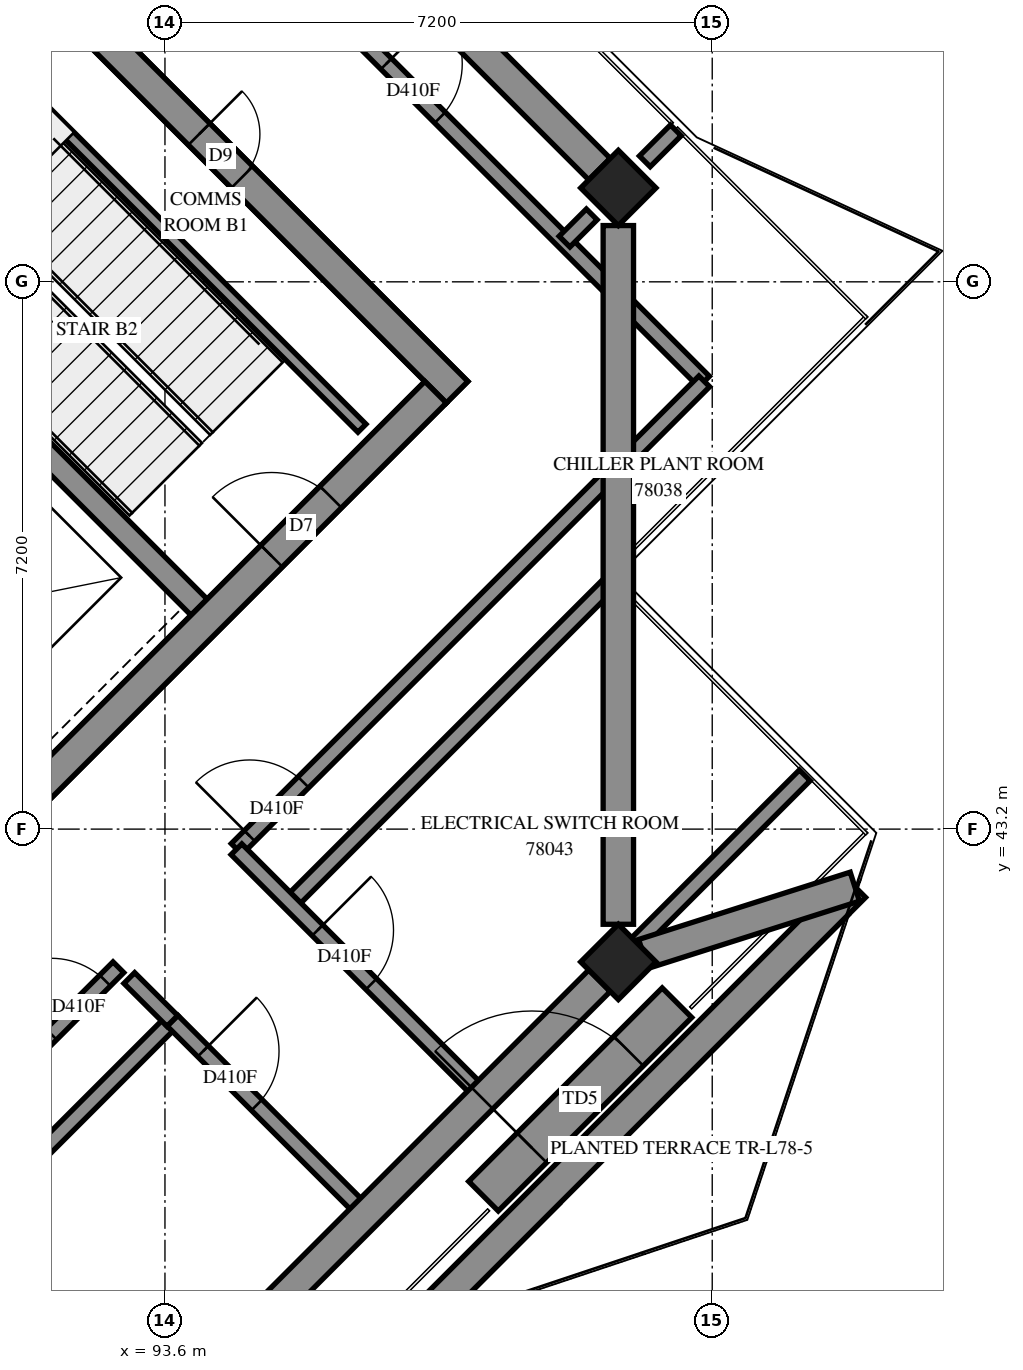
"""IFC4 building model, lengths in metres.
Left out: names, types, materials, properties, quantities, classifications, styles, units other than length and angle.
Written with IfcOpenShell. Run it as: python <this file> out.ifc"""

import sys

from ifc_helpers import new_model, si_unit, direction, frame, frame_2d, origin, origin_2d, place, context, subcontext, project, spatial, polyline, rectangle, outline, extrude, element, fill, save


model = new_model("IFC4")
c1 = context("Model", 3, precision=1e-05, world=origin(), true_north=direction((0.0, 1.0)))
c2 = subcontext(c1, "Body", "Model", "MODEL_VIEW")
j1 = project(units=[si_unit("LENGTHUNIT", "METRE"), si_unit("PLANEANGLEUNIT", "RADIAN")], contexts=[c1])
p1 = place(None, origin())
s1 = spatial("IfcSite", under=j1, at=p1, CompositionType="ELEMENT")
p2 = place(p1, origin())
s2 = spatial("IfcBuilding", under=s1, at=p2, CompositionType="ELEMENT")
p3 = place(p2, frame((0.0, 0.0, 284.6)))
s3 = spatial("IfcBuildingStorey", under=s2, at=p3, CompositionType="ELEMENT", Elevation=284.6)
for number, where, z_axis, x_axis in (
    (1, (99.565, 51.635, 0.0), (0.0, 0.0, 1.0), (0.707, -0.707, 0.0)),
    (2, (99.565, 41.453, 0.0), (0.0, 0.0, 1.0), (0.707, -0.707, 0.0)),
):
    element("IfcColumn", number, at=place(p3, frame(where, z_axis=z_axis, x_axis=x_axis)), inside=s3, PredefinedType="COLUMN", context=c2, shape_type="SweptSolid", body=[
        extrude(rectangle(XDim=0.7, YDim=0.7, at=origin_2d()), origin(), (0.0, 0.0, 1.0), 5.7),
    ])
p4 = place(p3, frame((86.695, 59.696, -0.3), z_axis=(0.0, 0.0, 1.0), x_axis=(0.7071100706, -0.7071034917, 0.0)))
e3 = element("IfcWall", 3, at=p4, inside=s3, PredefinedType="SHEAR", context=c2, shape_type="SweptSolid", body=[
    extrude(rectangle(XDim=15.2, YDim=0.4, at=frame_2d((7.6, 0.0))), origin(), (0.0, 0.0, 1.0), 5.3),
])
p5 = place(p4, frame((10.4, 0.0, 0.3)))
e4 = element("IfcOpeningElement", 4, at=p5, cuts=e3, PredefinedType="OPENING", context=c2, shape_type="SweptSolid", body=[
    extrude(rectangle(XDim=0.8, YDim=2.1, at=frame_2d((0.4, 1.05))), frame((0.0, 0.21, 0.0), z_axis=(0.0, -1.0, 0.0), x_axis=(1.0, 0.0, 0.0)), (0.0, 0.0, 1.0), 0.42),
])
p6 = place(p3, frame((86.978, 38.766, -0.3), z_axis=(0.0, 0.0, 1.0), x_axis=(0.7071067812, 0.7071067812, 0.0)))
e5 = element("IfcWall", 5, at=p6, inside=s3, PredefinedType="SHEAR", context=c2, shape_type="SweptSolid", body=[
    extrude(rectangle(XDim=14.4, YDim=0.4, at=frame_2d((7.2, 0.0))), origin(), (0.0, 0.0, 1.0), 5.3),
])
p7 = place(p6, frame((4.55, 0.0, 0.3)))
e6 = element("IfcOpeningElement", 6, at=p7, cuts=e5, PredefinedType="OPENING", context=c2, shape_type="SweptSolid", body=[
    extrude(rectangle(XDim=1.1, YDim=2.1, at=frame_2d((0.55, 1.05))), frame((0.0, 0.21, 0.0), z_axis=(0.0, -1.0, 0.0), x_axis=(1.0, 0.0, 0.0)), (0.0, 0.0, 1.0), 0.42),
])
p8 = place(p6, frame((11.35, 0.0, 0.3)))
e7 = element("IfcOpeningElement", 7, at=p8, cuts=e5, PredefinedType="OPENING", context=c2, shape_type="SweptSolid", body=[
    extrude(rectangle(XDim=1.1, YDim=2.1, at=frame_2d((0.55, 1.05))), frame((0.0, 0.21, 0.0), z_axis=(0.0, -1.0, 0.0), x_axis=(1.0, 0.0, 0.0)), (0.0, 0.0, 1.0), 0.42),
])
p9 = place(p3, frame((88.958, 51.211, 0.0), z_axis=(0.0, 0.0, 1.0), x_axis=(0.7070998367, -0.7071137256, 0.0)))
e8 = element("IfcWall", 8, at=p9, inside=s3, PredefinedType="SOLIDWALL", context=c2, shape_type="SweptSolid", body=[
    extrude(rectangle(XDim=7.2, YDim=0.3, at=frame_2d((3.6, 0.0))), origin(), (0.0, 0.0, 1.0), 5.7),
])
p10 = place(p3, frame((97.79, 38.371, 0.0), z_axis=(0.0, 0.0, 1.0), x_axis=(0.7071067812, 0.7071067812, 0.0)))
e9 = element("IfcWall", 9, at=p10, inside=s3, PredefinedType="SOLIDWALL", context=c2, shape_type="SweptSolid", body=[
    extrude(rectangle(XDim=3.6, YDim=0.55, at=frame_2d((1.8, 0.0))), origin(), (0.0, 0.0, 1.0), 5.7),
])
p11 = place(p10, frame((0.9, 0.0, 0.0)))
e10 = element("IfcOpeningElement", 10, at=p11, cuts=e9, PredefinedType="OPENING", context=c2, shape_type="SweptSolid", body=[
    extrude(rectangle(XDim=1.8, YDim=2.4, at=frame_2d((0.9, 1.2))), frame((0.0, 0.285, 0.0), z_axis=(0.0, -1.0, 0.0), x_axis=(1.0, 0.0, 0.0)), (0.0, 0.0, 1.0), 0.57),
])
p12 = place(p3, frame((91.313, 53.354, 0.0), z_axis=(0.0, 0.0, 1.0), x_axis=(0.7071140275, -0.7070995348, 0.0)))
e11 = element("IfcWall", 11, at=p12, inside=s3, PredefinedType="PARTITIONING", context=c2, shape_type="SweptSolid", body=[
    extrude(rectangle(XDim=6.9, YDim=0.15, at=frame_2d((3.45, 0.0))), origin(), (0.0, 0.0, 1.0), 5.7),
])
p13 = place(p3, frame((86.833, 62.947, 0.0), z_axis=(0.0, 0.0, 1.0), x_axis=(0.7071067812, -0.7071067812, 0.0)))
e12 = element("IfcWall", 12, at=p13, inside=s3, PredefinedType="PARTITIONING", context=c2, shape_type="SweptSolid", body=[
    extrude(rectangle(XDim=19.601, YDim=0.2, at=frame_2d((9.8, 0.0))), origin(), (0.0, 0.0, 1.0), 5.7),
])
p14 = place(p13, frame((6.487, 0.0, 0.0)))
e13 = element("IfcOpeningElement", 13, at=p14, cuts=e12, PredefinedType="OPENING", context=c2, shape_type="SweptSolid", body=[
    extrude(rectangle(XDim=1.0, YDim=2.1, at=frame_2d((0.5, 1.05))), frame((0.0, 0.11, 0.0), z_axis=(0.0, -1.0, 0.0), x_axis=(1.0, 0.0, 0.0)), (0.0, 0.0, 1.0), 0.22),
])
p15 = place(p13, frame((13.688, 0.0, 0.0)))
e14 = element("IfcOpeningElement", 14, at=p15, cuts=e12, PredefinedType="OPENING", context=c2, shape_type="SweptSolid", body=[
    extrude(rectangle(XDim=1.0, YDim=2.1, at=frame_2d((0.5, 1.05))), frame((0.0, 0.11, 0.0), z_axis=(0.0, -1.0, 0.0), x_axis=(1.0, 0.0, 0.0)), (0.0, 0.0, 1.0), 0.22),
])
p16 = place(p3, frame((86.079, 33.061, 0.0), z_axis=(0.0, 0.0, 1.0), x_axis=(0.7071067812, 0.7071067812, 0.0)))
e15 = element("IfcWall", 15, at=p16, inside=s3, PredefinedType="PARTITIONING", context=c2, shape_type="SweptSolid", body=[
    extrude(rectangle(XDim=10.771, YDim=0.2, at=frame_2d((5.385, 0.0))), origin(), (0.0, 0.0, 1.0), 5.7),
])
p17 = place(p3, frame((94.543, 42.939, 0.0), z_axis=(0.0, 0.0, 1.0), x_axis=(0.7071067812, 0.7071067812, 0.0)))
e16 = element("IfcWall", 16, at=p17, inside=s3, PredefinedType="PARTITIONING", context=c2, shape_type="SweptSolid", body=[
    extrude(rectangle(XDim=8.7, YDim=0.2, at=frame_2d((4.35, 0.0))), origin(), (0.0, 0.0, 1.0), 5.7),
])
p18 = place(p17, frame((0.242, 0.0, 0.0)))
e17 = element("IfcOpeningElement", 17, at=p18, cuts=e16, PredefinedType="OPENING", context=c2, shape_type="SweptSolid", body=[
    extrude(rectangle(XDim=1.0, YDim=2.1, at=frame_2d((0.5, 1.05))), frame((0.0, 0.11, 0.0), z_axis=(0.0, -1.0, 0.0), x_axis=(1.0, 0.0, 0.0)), (0.0, 0.0, 1.0), 0.22),
])
p19 = place(p3, frame((86.837, 35.233, 0.0), z_axis=(0.0, 0.0, 1.0), x_axis=(0.7071067812, 0.7071067812, 0.0)))
e18 = element("IfcWall", 18, at=p19, inside=s3, PredefinedType="PARTITIONING", context=c2, shape_type="SweptSolid", body=[
    extrude(rectangle(XDim=8.697, YDim=0.2, at=frame_2d((4.349, 0.0))), origin(), (0.0, 0.0, 1.0), 5.7),
])
p20 = place(p19, frame((7.45, 0.0, 0.0)))
e19 = element("IfcOpeningElement", 19, at=p20, cuts=e18, PredefinedType="OPENING", context=c2, shape_type="SweptSolid", body=[
    extrude(rectangle(XDim=1.0, YDim=2.1, at=frame_2d((0.5, 1.05))), frame((0.0, 0.11, 0.0), z_axis=(0.0, -1.0, 0.0), x_axis=(1.0, 0.0, 0.0)), (0.0, 0.0, 1.0), 0.22),
])
p21 = place(p3, frame((95.25, 42.232, 0.0), z_axis=(0.0, 0.0, 1.0), x_axis=(0.7071067812, 0.7071067812, 0.0)))
e20 = element("IfcWall", 20, at=p21, inside=s3, PredefinedType="PARTITIONING", context=c2, shape_type="SweptSolid", body=[
    extrude(rectangle(XDim=5.971, YDim=0.2, at=frame_2d((2.985, 0.0))), origin(), (0.0, 0.0, 1.0), 5.7),
])
p22 = place(p3, frame((94.541, 42.935, 0.0), z_axis=(0.0, 0.0, 1.0), x_axis=(0.7071067812, -0.7071067812, 0.0)))
e21 = element("IfcWall", 21, at=p22, inside=s3, PredefinedType="PARTITIONING", context=c2, shape_type="SweptSolid", body=[
    extrude(rectangle(XDim=4.599, YDim=0.2, at=frame_2d((2.3, 0.0))), origin(), (0.0, 0.0, 1.0), 5.7),
])
p23 = place(p22, frame((1.508, 0.0, 0.0)))
e22 = element("IfcOpeningElement", 22, at=p23, cuts=e21, PredefinedType="OPENING", context=c2, shape_type="SweptSolid", body=[
    extrude(rectangle(XDim=1.0, YDim=2.1, at=frame_2d((0.5, 1.05))), frame((0.0, 0.11, 0.0), z_axis=(0.0, -1.0, 0.0), x_axis=(1.0, 0.0, 0.0)), (0.0, 0.0, 1.0), 0.22),
])
p24 = place(p3, frame((93.699, 40.679, 0.0), z_axis=(0.0, 0.0, 1.0), x_axis=(0.7071067812, -0.7071067812, 0.0)))
e23 = element("IfcWall", 23, at=p24, inside=s3, PredefinedType="PARTITIONING", context=c2, shape_type="SweptSolid", body=[
    extrude(rectangle(XDim=3.601, YDim=0.2, at=frame_2d((1.8, 0.0))), origin(), (0.0, 0.0, 1.0), 5.7),
])
p25 = place(p24, frame((0.568, 0.0, 0.0)))
e24 = element("IfcOpeningElement", 24, at=p25, cuts=e23, PredefinedType="OPENING", context=c2, shape_type="SweptSolid", body=[
    extrude(rectangle(XDim=1.0, YDim=2.1, at=frame_2d((0.5, 1.05))), frame((0.0, 0.11, 0.0), z_axis=(0.0, -1.0, 0.0), x_axis=(1.0, 0.0, 0.0)), (0.0, 0.0, 1.0), 0.22),
])
p26 = place(p3, frame((99.214, 41.104, 0.0), z_axis=(0.0, 0.0, 1.0), x_axis=(0.7071067812, 0.7071067812, 0.0)))
e25 = element("IfcWall", 25, at=p26, inside=s3, PredefinedType="PARTITIONING", context=c2, shape_type="SweptSolid", body=[
    extrude(rectangle(XDim=3.966, YDim=0.2, at=frame_2d((1.983, 0.0))), origin(), (0.0, 0.0, 1.0), 5.7),
])
p27 = place(p3, frame((96.24, 38.132, 0.0), z_axis=(0.0, 0.0, 1.0), x_axis=(0.706651904, 0.7075613659, 0.0)))
e26 = element("IfcWall", 26, at=p27, inside=s3, PredefinedType="PARTITIONING", context=c2, shape_type="SweptSolid", body=[
    extrude(rectangle(XDim=2.199, YDim=0.2, at=frame_2d((1.1, 0.0))), origin(), (0.0, 0.0, 1.0), 5.2),
])
for number, where, z_axis, x_axis in (
    (27, (94.823, 36.713, 0.0), (0.0, 0.0, 1.0), (0.707, 0.707, 0.0)),
    (28, (97.796, 39.686, 0.0), (0.0, 0.0, 1.0), (0.707, 0.707, 0.0)),
):
    element("IfcWall", number, at=place(p3, frame(where, z_axis=z_axis, x_axis=x_axis)), inside=s3, PredefinedType="PARTITIONING", context=c2, shape_type="SweptSolid", body=[
        extrude(rectangle(XDim=2.005, YDim=0.2, at=frame_2d((1.003, 0.0))), origin(), (0.0, 0.0, 1.0), 5.2),
    ])
p28 = place(p3, frame((93.131, 41.241, 0.0), z_axis=(0.0, 0.0, 1.0), x_axis=(0.7083571881, -0.7058541592, 0.0)))
e29 = element("IfcWall", 29, at=p28, inside=s3, PredefinedType="PARTITIONING", context=c2, shape_type="SweptSolid", body=[
    extrude(rectangle(XDim=0.799, YDim=0.2, at=frame_2d((0.4, 0.0))), origin(), (0.0, 0.0, 1.0), 5.7),
])
p29 = place(p3, frame((99.913, 51.985, 0.0), z_axis=(0.0, 0.0, 1.0), x_axis=(0.7071067812, 0.7071067812, 0.0)))
e30 = element("IfcWall", 30, at=p29, inside=s3, PredefinedType="PARTITIONING", context=c2, shape_type="SweptSolid", body=[
    extrude(rectangle(XDim=0.577, YDim=0.2, at=frame_2d((0.288, 0.0))), origin(), (0.0, 0.0, 1.0), 5.7),
])
p30 = place(p3, frame((98.857, 50.929, 0.0), z_axis=(0.0, 0.0, 1.0), x_axis=(0.7071067812, 0.7071067812, 0.0)))
e31 = element("IfcWall", 31, at=p30, inside=s3, PredefinedType="PARTITIONING", context=c2, shape_type="SweptSolid", body=[
    extrude(rectangle(XDim=0.506, YDim=0.2, at=frame_2d((0.253, 0.0))), origin(), (0.0, 0.0, 1.0), 5.7),
])
p31 = place(p3, frame((102.518, 42.143, 0.0), z_axis=(0.0, 0.0, 1.0), x_axis=(-0.7071067812, -0.7071067812, 0.0)))
e32 = element("IfcWall", 32, at=p31, inside=s3, PredefinedType="PARAPET", context=c2, shape_type="SweptSolid", body=[
    extrude(outline(polyline([(0.0, -0.1), (3.04, -0.1), (3.04, 0.1), (0.0, 0.1), (0.0, -0.1)])), origin(), (0.0, 0.0, 1.0), 0.25),
])
p32 = place(p3, frame((98.713, 38.339, 0.0), z_axis=(0.0, 0.0, 1.0), x_axis=(-0.7071297964, -0.7070837653, 0.0)))
e33 = element("IfcWall", 33, at=p32, inside=s3, PredefinedType="PARAPET", context=c2, shape_type="SweptSolid", body=[
    extrude(outline(polyline([(0.0, -0.1), (2.172, -0.1), (2.172, 0.1), (0.0, 0.1), (0.0, -0.1)])), origin(), (0.0, 0.0, 1.0), 0.25),
])
p33 = place(p11, origin())
e34 = element("IfcDoor", 34, at=p33, inside=s3, OperationType="SINGLE_SWING_LEFT", PredefinedType="DOOR", context=c2, shape_type="SweptSolid", body=[
    extrude(rectangle(XDim=1.8, YDim=2.4, at=frame_2d((0.9, 1.2))), frame((0.0, 0.025, 0.0), z_axis=(0.0, -1.0, 0.0), x_axis=(1.0, 0.0, 0.0)), (0.0, 0.0, 1.0), 0.05),
])
fill(e10, e34)
p34 = place(p5, origin())
e35 = element("IfcDoor", 35, at=p34, inside=s3, OperationType="SINGLE_SWING_RIGHT", PredefinedType="DOOR", context=c2, shape_type="SweptSolid", body=[
    extrude(rectangle(XDim=0.8, YDim=2.1, at=frame_2d((0.4, 1.05))), frame((0.0, 0.025, 0.0), z_axis=(0.0, -1.0, 0.0), x_axis=(1.0, 0.0, 0.0)), (0.0, 0.0, 1.0), 0.05),
])
fill(e4, e35)
p35 = place(p8, origin())
e36 = element("IfcDoor", 36, at=p35, inside=s3, OperationType="SINGLE_SWING_RIGHT", PredefinedType="DOOR", context=c2, shape_type="SweptSolid", body=[
    extrude(rectangle(XDim=1.1, YDim=2.1, at=frame_2d((0.55, 1.05))), frame((0.0, 0.025, 0.0), z_axis=(0.0, -1.0, 0.0), x_axis=(1.0, 0.0, 0.0)), (0.0, 0.0, 1.0), 0.05),
])
fill(e7, e36)
p36 = place(p18, origin())
e37 = element("IfcDoor", 37, at=p36, inside=s3, OperationType="SINGLE_SWING_LEFT", PredefinedType="DOOR", context=c2, shape_type="SweptSolid", body=[
    extrude(rectangle(XDim=1.0, YDim=2.1, at=frame_2d((0.5, 1.05))), frame((0.0, 0.025, 0.0), z_axis=(0.0, -1.0, 0.0), x_axis=(1.0, 0.0, 0.0)), (0.0, 0.0, 1.0), 0.05),
])
fill(e17, e37)
p37 = place(p15, origin())
e38 = element("IfcDoor", 38, at=p37, inside=s3, OperationType="SINGLE_SWING_LEFT", PredefinedType="DOOR", context=c2, shape_type="SweptSolid", body=[
    extrude(rectangle(XDim=1.0, YDim=2.1, at=frame_2d((0.5, 1.05))), frame((0.0, 0.025, 0.0), z_axis=(0.0, -1.0, 0.0), x_axis=(1.0, 0.0, 0.0)), (0.0, 0.0, 1.0), 0.05),
])
fill(e14, e38)
p38 = place(p20, origin())
e39 = element("IfcDoor", 39, at=p38, inside=s3, OperationType="SINGLE_SWING_LEFT", PredefinedType="DOOR", context=c2, shape_type="SweptSolid", body=[
    extrude(rectangle(XDim=1.0, YDim=2.1, at=frame_2d((0.5, 1.05))), frame((0.0, 0.025, 0.0), z_axis=(0.0, -1.0, 0.0), x_axis=(1.0, 0.0, 0.0)), (0.0, 0.0, 1.0), 0.05),
])
fill(e19, e39)
p39 = place(p25, origin())
e40 = element("IfcDoor", 40, at=p39, inside=s3, OperationType="SINGLE_SWING_LEFT", PredefinedType="DOOR", context=c2, shape_type="SweptSolid", body=[
    extrude(rectangle(XDim=1.0, YDim=2.1, at=frame_2d((0.5, 1.05))), frame((0.0, 0.025, 0.0), z_axis=(0.0, -1.0, 0.0), x_axis=(1.0, 0.0, 0.0)), (0.0, 0.0, 1.0), 0.05),
])
fill(e24, e40)
p40 = place(p23, origin())
e41 = element("IfcDoor", 41, at=p40, inside=s3, OperationType="SINGLE_SWING_RIGHT", PredefinedType="DOOR", context=c2, shape_type="SweptSolid", body=[
    extrude(rectangle(XDim=1.0, YDim=2.1, at=frame_2d((0.5, 1.05))), frame((0.0, 0.025, 0.0), z_axis=(0.0, -1.0, 0.0), x_axis=(1.0, 0.0, 0.0)), (0.0, 0.0, 1.0), 0.05),
])
fill(e22, e41)
save(model, sys.argv[1])
